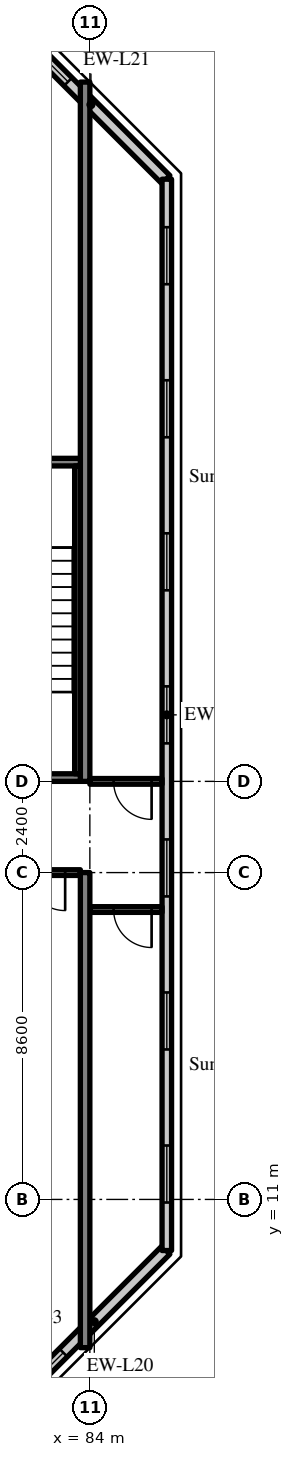
"""IFC4 building model, lengths in metres.
Left out: names, types, materials, properties, quantities, classifications, styles, units other than length and angle.
Written with IfcOpenShell. Run it as: python <this file> out.ifc"""

import sys

from ifc_helpers import new_model, si_unit, direction, frame, frame_2d, origin, place, context, subcontext, project, spatial, rectangle, extrude, source, transform, mapped, element, fill, save


model = new_model("IFC4")
c1 = context("Model", 3, precision=1e-05, world=origin(), true_north=direction((0.0, 1.0)))
c2 = subcontext(c1, "Body", "Model", "MODEL_VIEW")
j1 = project(units=[si_unit("LENGTHUNIT", "METRE"), si_unit("PLANEANGLEUNIT", "RADIAN")], contexts=[c1])
p1 = place(None, origin())
s1 = spatial("IfcSite", under=j1, at=p1, CompositionType="ELEMENT")
p2 = place(p1, origin())
s2 = spatial("IfcBuilding", under=s1, at=p2, CompositionType="ELEMENT")
p3 = place(p2, frame((0.0, 0.0, 301.7)))
s3 = spatial("IfcBuildingStorey", under=s2, at=p3, CompositionType="ELEMENT", Elevation=301.7)
m1 = source(origin(), c2, "Body", "SweptSolid", [
    extrude(rectangle(XDim=12.5, YDim=0.25, at=frame_2d((6.25, 0.0))), origin(), (0.0, 0.0, 1.0), 3.72),
])
p4 = place(p3, frame((83.875, 7.1, 0.0), z_axis=(0.0, 0.0, 1.0), x_axis=(0.0, 1.0, 0.0)))
e1 = element("IfcWall", 1, at=p4, inside=s3, PredefinedType="SHEAR", context=c2, shape_type="MappedRepresentation", body=[
    mapped(m1, transform((0.0, 0.0, 0.0), scale=1.0)),
])
m2 = source(origin(), c2, "Body", "SweptSolid", [
    extrude(rectangle(XDim=18.4, YDim=0.25, at=frame_2d((9.2, 0.0))), origin(), (0.0, 0.0, 1.0), 3.72),
])
p5 = place(p3, frame((83.875, 22.0, 0.0), z_axis=(0.0, 0.0, 1.0), x_axis=(0.0, 1.0, 0.0)))
e2 = element("IfcWall", 2, at=p5, inside=s3, PredefinedType="SHEAR", context=c2, shape_type="MappedRepresentation", body=[
    mapped(m2, transform((0.0, 0.0, 0.0), scale=1.0)),
])
m3 = source(origin(), c2, "Body", "SweptSolid", [
    extrude(rectangle(XDim=5.326, YDim=0.3, at=frame_2d((2.663, 0.0))), origin(), (0.0, 0.0, 1.0), 3.72),
])
p6 = place(p3, frame((82.234, 5.9, 0.0), z_axis=(0.0, 0.0, 1.0), x_axis=(0.707083859269, 0.707129702361, 0.0)))
e3 = element("IfcWall", 3, at=p6, inside=s3, PredefinedType="SOLIDWALL", context=c2, shape_type="MappedRepresentation", body=[
    mapped(m3, transform((0.0, 0.0, 0.0), scale=1.0)),
])
m4 = source(origin(), c2, "Body", "SweptSolid", [
    extrude(rectangle(XDim=1.2, YDim=1.5, at=frame_2d((0.6, 0.75))), frame((0.0, 0.16, 0.0), z_axis=(0.0, -1.0, 0.0), x_axis=(1.0, 0.0, 0.0)), (0.0, 0.0, 1.0), 0.32),
])
p7 = place(p6, frame((0.31, 0.0, 0.9)))
e4 = element("IfcOpeningElement", 4, at=p7, cuts=e3, PredefinedType="OPENING", context=c2, shape_type="MappedRepresentation", body=[
    mapped(m4, transform((0.0, 0.0, 0.0), scale=1.0)),
])
m5 = source(origin(), c2, "Body", "SweptSolid", [
    extrude(rectangle(XDim=5.576, YDim=0.3, at=frame_2d((2.788, 0.0))), origin(), (0.0, 0.0, 1.0), 3.72),
])
p8 = place(p3, frame((86.0, 37.834, 0.0), z_axis=(0.0, 0.0, 1.0), x_axis=(-0.707106781187, 0.707106781187, 0.0)))
e5 = element("IfcWall", 5, at=p8, inside=s3, PredefinedType="SOLIDWALL", context=c2, shape_type="MappedRepresentation", body=[
    mapped(m5, transform((0.0, 0.0, 0.0), scale=1.0)),
])
m6 = source(origin(), c2, "Body", "SweptSolid", [
    extrude(rectangle(XDim=1.8, YDim=1.5, at=frame_2d((0.9, 0.75))), frame((0.0, 0.16, 0.0), z_axis=(0.0, -1.0, 0.0), x_axis=(1.0, 0.0, 0.0)), (0.0, 0.0, 1.0), 0.32),
])
p9 = place(p8, frame((3.641, 0.0, 0.9)))
e6 = element("IfcOpeningElement", 6, at=p9, cuts=e5, PredefinedType="OPENING", context=c2, shape_type="MappedRepresentation", body=[
    mapped(m6, transform((0.0, 0.0, 0.0), scale=1.0)),
])
m7 = source(origin(), c2, "Body", "SweptSolid", [
    extrude(rectangle(XDim=28.189, YDim=0.25, at=frame_2d((14.095, 0.0))), origin(), (0.0, 0.0, 1.0), 3.72),
])
p10 = place(p3, frame((86.025, 9.655, 0.0), z_axis=(0.0, 0.0, 1.0), x_axis=(0.0, 1.0, 0.0)))
e7 = element("IfcWall", 7, at=p10, inside=s3, PredefinedType="SOLIDWALL", context=c2, shape_type="MappedRepresentation", body=[
    mapped(m7, transform((0.0, 0.0, 0.0), scale=1.0)),
])
m8 = source(origin(), c2, "Body", "SweptSolid", [
    extrude(rectangle(XDim=1.5, YDim=1.5, at=frame_2d((0.75, 0.75))), frame((0.0, 0.135, 0.0), z_axis=(0.0, -1.0, 0.0), x_axis=(1.0, 0.0, 0.0)), (0.0, 0.0, 1.0), 0.27),
])
p11 = place(p10, frame((1.263, 0.0, 0.9)))
e8 = element("IfcOpeningElement", 8, at=p11, cuts=e7, PredefinedType="OPENING", context=c2, shape_type="MappedRepresentation", body=[
    mapped(m8, transform((0.0, 0.0, 0.0), scale=1.0)),
])
p12 = place(p10, frame((5.291, 0.0, 0.9)))
e9 = element("IfcOpeningElement", 9, at=p12, cuts=e7, PredefinedType="OPENING", context=c2, shape_type="MappedRepresentation", body=[
    mapped(m8, transform((0.0, 0.0, 0.0), scale=1.0)),
])
p13 = place(p10, frame((9.318, 0.0, 0.9)))
e10 = element("IfcOpeningElement", 10, at=p13, cuts=e7, PredefinedType="OPENING", context=c2, shape_type="MappedRepresentation", body=[
    mapped(m8, transform((0.0, 0.0, 0.0), scale=1.0)),
])
p14 = place(p10, frame((13.345, 0.0, 0.9)))
e11 = element("IfcOpeningElement", 11, at=p14, cuts=e7, PredefinedType="OPENING", context=c2, shape_type="MappedRepresentation", body=[
    mapped(m8, transform((0.0, 0.0, 0.0), scale=1.0)),
])
p15 = place(p10, frame((17.372, 0.0, 0.9)))
e12 = element("IfcOpeningElement", 12, at=p15, cuts=e7, PredefinedType="OPENING", context=c2, shape_type="MappedRepresentation", body=[
    mapped(m8, transform((0.0, 0.0, 0.0), scale=1.0)),
])
p16 = place(p10, frame((21.399, 0.0, 0.9)))
e13 = element("IfcOpeningElement", 13, at=p16, cuts=e7, PredefinedType="OPENING", context=c2, shape_type="MappedRepresentation", body=[
    mapped(m8, transform((0.0, 0.0, 0.0), scale=1.0)),
])
p17 = place(p10, frame((25.426, 0.0, 0.9)))
e14 = element("IfcOpeningElement", 14, at=p17, cuts=e7, PredefinedType="OPENING", context=c2, shape_type="MappedRepresentation", body=[
    mapped(m8, transform((0.0, 0.0, 0.0), scale=1.0)),
])
m9 = source(origin(), c2, "Body", "SweptSolid", [
    extrude(rectangle(XDim=8.15, YDim=0.2, at=frame_2d((4.075, 0.0))), origin(), (0.0, 0.0, 1.0), 3.72),
])
p18 = place(p3, frame((83.75, 22.1, 0.0), z_axis=(0.0, 0.0, 1.0), x_axis=(-1.0, 0.0, 0.0)))
e15 = element("IfcWall", 15, at=p18, inside=s3, PredefinedType="SOLIDWALL", context=c2, shape_type="MappedRepresentation", body=[
    mapped(m9, transform((0.0, 0.0, 0.0), scale=1.0)),
])
m10 = source(origin(), c2, "Body", "SweptSolid", [
    extrude(rectangle(XDim=1.2, YDim=2.1, at=frame_2d((0.6, 1.05))), frame((0.0, 0.11, 0.0), z_axis=(0.0, -1.0, 0.0), x_axis=(1.0, 0.0, 0.0)), (0.0, 0.0, 1.0), 0.22),
])
p19 = place(p18, frame((5.95, 0.0, 0.0)))
e16 = element("IfcOpeningElement", 16, at=p19, cuts=e15, PredefinedType="OPENING", context=c2, shape_type="MappedRepresentation", body=[
    mapped(m10, transform((0.0, 0.0, 0.0), scale=1.0)),
])
p20 = place(p3, frame((83.75, 30.4, 0.0), z_axis=(0.0, 0.0, 1.0), x_axis=(-1.0, 0.0, 0.0)))
e17 = element("IfcWall", 17, at=p20, inside=s3, PredefinedType="SOLIDWALL", context=c2, shape_type="MappedRepresentation", body=[
    mapped(m9, transform((0.0, 0.0, 0.0), scale=1.0)),
])
m11 = source(origin(), c2, "Body", "SweptSolid", [
    extrude(rectangle(XDim=1.0, YDim=2.1, at=frame_2d((0.5, 1.05))), frame((0.0, 0.11, 0.0), z_axis=(0.0, -1.0, 0.0), x_axis=(1.0, 0.0, 0.0)), (0.0, 0.0, 1.0), 0.22),
])
p21 = place(p20, frame((6.05, 0.0, 0.0)))
e18 = element("IfcOpeningElement", 18, at=p21, cuts=e17, PredefinedType="OPENING", context=c2, shape_type="MappedRepresentation", body=[
    mapped(m11, transform((0.0, 0.0, 0.0), scale=1.0)),
])
m12 = source(origin(), c2, "Body", "SweptSolid", [
    extrude(rectangle(XDim=8.1, YDim=0.15, at=frame_2d((4.05, 0.0))), origin(), (0.0, 0.0, 1.0), 3.72),
])
p22 = place(p3, frame((83.675, 22.2, 0.0), z_axis=(0.0, 0.0, 1.0), x_axis=(0.0, 1.0, 0.0)))
e19 = element("IfcWall", 19, at=p22, inside=s3, PredefinedType="SOLIDWALL", context=c2, shape_type="MappedRepresentation", body=[
    mapped(m12, transform((0.0, 0.0, 0.0), scale=1.0)),
])
m13 = source(origin(), c2, "Body", "SweptSolid", [
    extrude(rectangle(XDim=8.025, YDim=0.15, at=frame_2d((4.012, 0.0))), origin(), (0.0, 0.0, 1.0), 3.02),
])
p23 = place(p3, frame((75.725, 19.6, 0.0), z_axis=(0.0, 0.0, 1.0), x_axis=(1.0, 0.0, 0.0)))
e20 = element("IfcWall", 20, at=p23, inside=s3, PredefinedType="PARTITIONING", context=c2, shape_type="MappedRepresentation", body=[
    mapped(m13, transform((0.0, 0.0, 0.0), scale=1.0)),
])
m14 = source(origin(), c2, "Body", "SweptSolid", [
    extrude(rectangle(XDim=1.0, YDim=2.1, at=frame_2d((0.5, 1.05))), frame((0.0, 0.085, 0.0), z_axis=(0.0, -1.0, 0.0), x_axis=(1.0, 0.0, 0.0)), (0.0, 0.0, 1.0), 0.17),
])
p24 = place(p23, frame((6.625, 0.0, 0.0)))
e21 = element("IfcOpeningElement", 21, at=p24, cuts=e20, PredefinedType="OPENING", context=c2, shape_type="MappedRepresentation", body=[
    mapped(m14, transform((0.0, 0.0, 0.0), scale=1.0)),
])
m15 = source(origin(), c2, "Body", "SweptSolid", [
    extrude(rectangle(XDim=1.9, YDim=0.15, at=frame_2d((0.95, 0.0))), origin(), (0.0, 0.0, 1.0), 3.02),
])
p25 = place(p3, frame((84.0, 22.0, 0.0), z_axis=(0.0, 0.0, 1.0), x_axis=(1.0, 0.0, 0.0)))
e22 = element("IfcWall", 22, at=p25, inside=s3, PredefinedType="PARTITIONING", context=c2, shape_type="MappedRepresentation", body=[
    mapped(m15, transform((0.0, 0.0, 0.0), scale=1.0)),
])
p26 = place(p25, frame((0.625, 0.0, 0.0)))
e23 = element("IfcOpeningElement", 23, at=p26, cuts=e22, PredefinedType="OPENING", context=c2, shape_type="MappedRepresentation", body=[
    mapped(m14, transform((0.0, 0.0, 0.0), scale=1.0)),
])
p27 = place(p3, frame((84.0, 18.628, 0.0), z_axis=(0.0, 0.0, 1.0), x_axis=(1.0, 0.0, 0.0)))
e24 = element("IfcWall", 24, at=p27, inside=s3, PredefinedType="PARTITIONING", context=c2, shape_type="MappedRepresentation", body=[
    mapped(m15, transform((0.0, 0.0, 0.0), scale=1.0)),
])
p28 = place(p27, frame((0.625, 0.0, 0.0)))
e25 = element("IfcOpeningElement", 25, at=p28, cuts=e24, PredefinedType="OPENING", context=c2, shape_type="MappedRepresentation", body=[
    mapped(m14, transform((0.0, 0.0, 0.0), scale=1.0)),
])
m16 = source(origin(), c2, "Body", "SweptSolid", [
    extrude(rectangle(XDim=1.2, YDim=1.5, at=frame_2d((0.6, 0.75))), frame((0.0, 0.03, 0.0), z_axis=(0.0, -1.0, 0.0), x_axis=(1.0, 0.0, 0.0)), (0.0, 0.0, 1.0), 0.06),
])
p29 = place(p7, origin())
e26 = element("IfcWindow", 26, at=p29, inside=s3, PartitioningType="SINGLE_PANEL", PredefinedType="WINDOW", context=c2, shape_type="MappedRepresentation", body=[
    mapped(m16, transform((0.0, 0.0, 0.0), scale=1.0)),
])
fill(e4, e26)
m17 = source(origin(), c2, "Body", "SweptSolid", [
    extrude(rectangle(XDim=1.8, YDim=1.5, at=frame_2d((0.9, 0.75))), frame((0.0, 0.03, 0.0), z_axis=(0.0, -1.0, 0.0), x_axis=(1.0, 0.0, 0.0)), (0.0, 0.0, 1.0), 0.06),
])
p30 = place(p9, origin())
e27 = element("IfcWindow", 27, at=p30, inside=s3, PartitioningType="SINGLE_PANEL", PredefinedType="WINDOW", context=c2, shape_type="MappedRepresentation", body=[
    mapped(m17, transform((0.0, 0.0, 0.0), scale=1.0)),
])
fill(e6, e27)
m18 = source(origin(), c2, "Body", "SweptSolid", [
    extrude(rectangle(XDim=1.5, YDim=1.5, at=frame_2d((0.75, 0.75))), frame((0.0, 0.03, 0.0), z_axis=(0.0, -1.0, 0.0), x_axis=(1.0, 0.0, 0.0)), (0.0, 0.0, 1.0), 0.06),
])
p31 = place(p11, origin())
e28 = element("IfcWindow", 28, at=p31, inside=s3, PartitioningType="SINGLE_PANEL", PredefinedType="WINDOW", context=c2, shape_type="MappedRepresentation", body=[
    mapped(m18, transform((0.0, 0.0, 0.0), scale=1.0)),
])
fill(e8, e28)
p32 = place(p12, origin())
e29 = element("IfcWindow", 29, at=p32, inside=s3, PartitioningType="SINGLE_PANEL", PredefinedType="WINDOW", context=c2, shape_type="MappedRepresentation", body=[
    mapped(m18, transform((0.0, 0.0, 0.0), scale=1.0)),
])
fill(e9, e29)
p33 = place(p13, origin())
e30 = element("IfcWindow", 30, at=p33, inside=s3, PartitioningType="SINGLE_PANEL", PredefinedType="WINDOW", context=c2, shape_type="MappedRepresentation", body=[
    mapped(m18, transform((0.0, 0.0, 0.0), scale=1.0)),
])
fill(e10, e30)
p34 = place(p14, origin())
e31 = element("IfcWindow", 31, at=p34, inside=s3, PartitioningType="SINGLE_PANEL", PredefinedType="WINDOW", context=c2, shape_type="MappedRepresentation", body=[
    mapped(m18, transform((0.0, 0.0, 0.0), scale=1.0)),
])
fill(e11, e31)
p35 = place(p15, origin())
e32 = element("IfcWindow", 32, at=p35, inside=s3, PartitioningType="SINGLE_PANEL", PredefinedType="WINDOW", context=c2, shape_type="MappedRepresentation", body=[
    mapped(m18, transform((0.0, 0.0, 0.0), scale=1.0)),
])
fill(e12, e32)
p36 = place(p16, origin())
e33 = element("IfcWindow", 33, at=p36, inside=s3, PartitioningType="SINGLE_PANEL", PredefinedType="WINDOW", context=c2, shape_type="MappedRepresentation", body=[
    mapped(m18, transform((0.0, 0.0, 0.0), scale=1.0)),
])
fill(e13, e33)
p37 = place(p17, origin())
e34 = element("IfcWindow", 34, at=p37, inside=s3, PartitioningType="SINGLE_PANEL", PredefinedType="WINDOW", context=c2, shape_type="MappedRepresentation", body=[
    mapped(m18, transform((0.0, 0.0, 0.0), scale=1.0)),
])
fill(e14, e34)
m19 = source(origin(), c2, "Body", "SweptSolid", [
    extrude(rectangle(XDim=1.0, YDim=2.1, at=frame_2d((0.5, 1.05))), frame((0.0, 0.025, 0.0), z_axis=(0.0, -1.0, 0.0), x_axis=(1.0, 0.0, 0.0)), (0.0, 0.0, 1.0), 0.05),
])
p38 = place(p24, origin())
e35 = element("IfcDoor", 35, at=p38, inside=s3, OperationType="SINGLE_SWING_RIGHT", PredefinedType="DOOR", context=c2, shape_type="MappedRepresentation", body=[
    mapped(m19, transform((0.0, 0.0, 0.0), scale=1.0)),
])
fill(e21, e35)
p39 = place(p26, origin())
e36 = element("IfcDoor", 36, at=p39, inside=s3, OperationType="SINGLE_SWING_RIGHT", PredefinedType="DOOR", context=c2, shape_type="MappedRepresentation", body=[
    mapped(m19, transform((0.0, 0.0, 0.0), scale=1.0)),
])
fill(e23, e36)
p40 = place(p28, origin())
e37 = element("IfcDoor", 37, at=p40, inside=s3, OperationType="SINGLE_SWING_RIGHT", PredefinedType="DOOR", context=c2, shape_type="MappedRepresentation", body=[
    mapped(m19, transform((0.0, 0.0, 0.0), scale=1.0)),
])
fill(e25, e37)
save(model, sys.argv[1])
